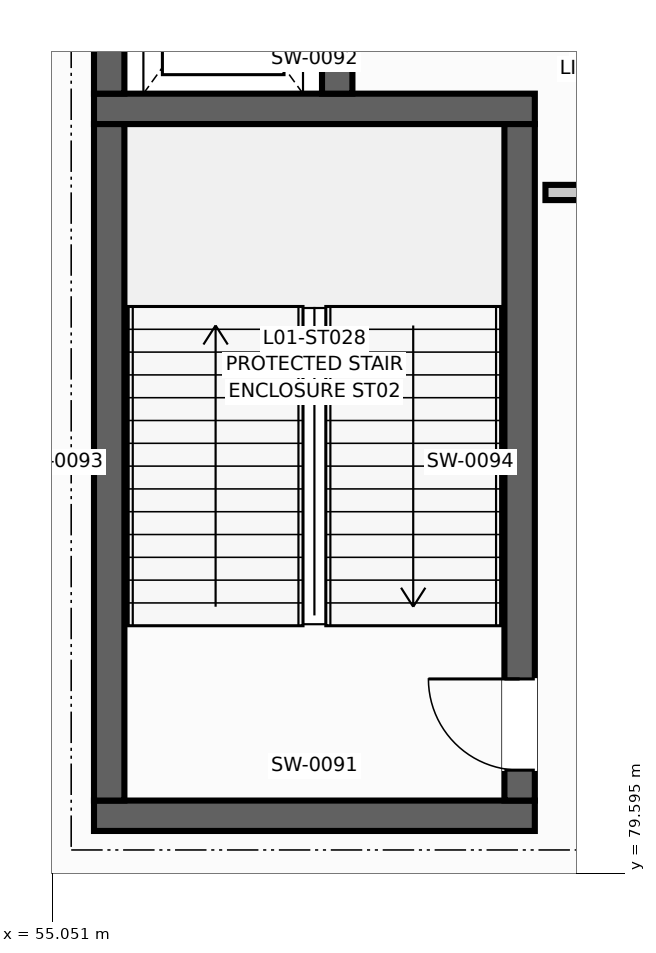
"""IFC4 building model, lengths in metres.
Left out: names, types, materials, properties, quantities, classifications, styles, units other than length and angle.
Written with IfcOpenShell. Run it as: python <this file> out.ifc"""

import sys

from ifc_helpers import new_model, si_unit, direction, frame, frame_2d, origin, place, context, subcontext, project, spatial, rectangle, extrude, element, fill, save


model = new_model("IFC4")
c1 = context("Model", 3, precision=1e-05, world=origin(), true_north=direction((0.0, 1.0)))
c2 = subcontext(c1, "Body", "Model", "MODEL_VIEW")
j1 = project(units=[si_unit("LENGTHUNIT", "METRE"), si_unit("PLANEANGLEUNIT", "RADIAN")], contexts=[c1])
p1 = place(None, origin())
s1 = spatial("IfcSite", under=j1, at=p1, CompositionType="ELEMENT")
p2 = place(p1, origin())
s2 = spatial("IfcBuilding", under=s1, at=p2, CompositionType="ELEMENT")
p3 = place(p2, frame((0.0, 0.0, 4.5)))
s3 = spatial("IfcBuildingStorey", under=s2, at=p3, CompositionType="ELEMENT", Elevation=4.5)
for number, where, z_axis, x_axis in (
    (1, (55.6, 80.35, 0.0), (0.0, 0.0, 1.0), (1.0, 0.0, 0.0)),
    (2, (55.6, 89.65, 0.0), (0.0, 0.0, 1.0), (1.0, 0.0, 0.0)),
):
    element("IfcWall", number, at=place(p3, frame(where, z_axis=z_axis, x_axis=x_axis)), inside=s3, PredefinedType="SHEAR", context=c2, shape_type="SweptSolid", body=[
        extrude(rectangle(XDim=5.8, YDim=0.4, at=frame_2d((2.9, 0.0))), origin(), (0.0, 0.0, 1.0), 4.25),
    ])
p4 = place(p3, frame((55.8, 80.55, 0.0), z_axis=(0.0, 0.0, 1.0), x_axis=(0.0, 1.0, 0.0)))
e3 = element("IfcWall", 3, at=p4, inside=s3, PredefinedType="SHEAR", context=c2, shape_type="SweptSolid", body=[
    extrude(rectangle(XDim=8.9, YDim=0.4, at=frame_2d((4.45, 0.0))), origin(), (0.0, 0.0, 1.0), 4.25),
])
p5 = place(p3, frame((61.2, 80.55, 0.0), z_axis=(0.0, 0.0, 1.0), x_axis=(0.0, 1.0, 0.0)))
e4 = element("IfcWall", 4, at=p5, inside=s3, PredefinedType="SHEAR", context=c2, shape_type="SweptSolid", body=[
    extrude(rectangle(XDim=8.9, YDim=0.4, at=frame_2d((4.45, 0.0))), origin(), (0.0, 0.0, 1.0), 4.25),
])
p6 = place(p5, frame((0.4, 0.0, 0.0)))
e5 = element("IfcOpeningElement", 5, at=p6, cuts=e4, PredefinedType="OPENING", context=c2, shape_type="SweptSolid", body=[
    extrude(rectangle(XDim=1.2, YDim=2.2, at=frame_2d((0.6, 1.1))), frame((0.0, 0.21, 0.0), z_axis=(0.0, -1.0, 0.0), x_axis=(1.0, 0.0, 0.0)), (0.0, 0.0, 1.0), 0.42),
])
p7 = place(p3, frame((55.8, 89.85, 0.0), z_axis=(0.0, 0.0, 1.0), x_axis=(0.0, 1.0, 0.0)))
e6 = element("IfcWall", 6, at=p7, inside=s3, PredefinedType="SHEAR", context=c2, shape_type="SweptSolid", body=[
    extrude(rectangle(XDim=2.9, YDim=0.4, at=frame_2d((1.45, 0.0))), origin(), (0.0, 0.0, 1.0), 4.25),
])
p8 = place(p3, frame((58.8, 89.85, 0.0), z_axis=(0.0, 0.0, 1.0), x_axis=(0.0, 1.0, 0.0)))
e7 = element("IfcWall", 7, at=p8, inside=s3, PredefinedType="SHEAR", context=c2, shape_type="SweptSolid", body=[
    extrude(rectangle(XDim=2.9, YDim=0.4, at=frame_2d((1.45, 0.0))), origin(), (0.0, 0.0, 1.0), 4.25),
])
p9 = place(p8, frame((0.9, 0.0, 0.0)))
e8 = element("IfcOpeningElement", 8, at=p9, cuts=e7, PredefinedType="OPENING", context=c2, shape_type="SweptSolid", body=[
    extrude(rectangle(XDim=1.1, YDim=2.2, at=frame_2d((0.55, 1.1))), frame((0.0, 0.21, 0.0), z_axis=(0.0, -1.0, 0.0), x_axis=(1.0, 0.0, 0.0)), (0.0, 0.0, 1.0), 0.42),
])
p10 = place(p3, frame((61.54, 88.55, 0.0), z_axis=(0.0, 0.0, 1.0), x_axis=(1.0, 0.0, 0.0)))
e9 = element("IfcWall", 9, at=p10, inside=s3, PredefinedType="PARTITIONING", context=c2, shape_type="SweptSolid", body=[
    extrude(rectangle(XDim=4.18, YDim=0.2, at=frame_2d((2.09, 0.0))), origin(), (0.0, 0.0, 1.0), 3.22),
])
p11 = place(p6, origin())
e10 = element("IfcDoor", 10, at=p11, inside=s3, OperationType="SINGLE_SWING_RIGHT", PredefinedType="DOOR", context=c2, shape_type="SweptSolid", body=[
    extrude(rectangle(XDim=1.2, YDim=2.2, at=frame_2d((0.6, 1.1))), frame((0.0, 0.025, 0.0), z_axis=(0.0, -1.0, 0.0), x_axis=(1.0, 0.0, 0.0)), (0.0, 0.0, 1.0), 0.05),
])
fill(e5, e10)
save(model, sys.argv[1])
